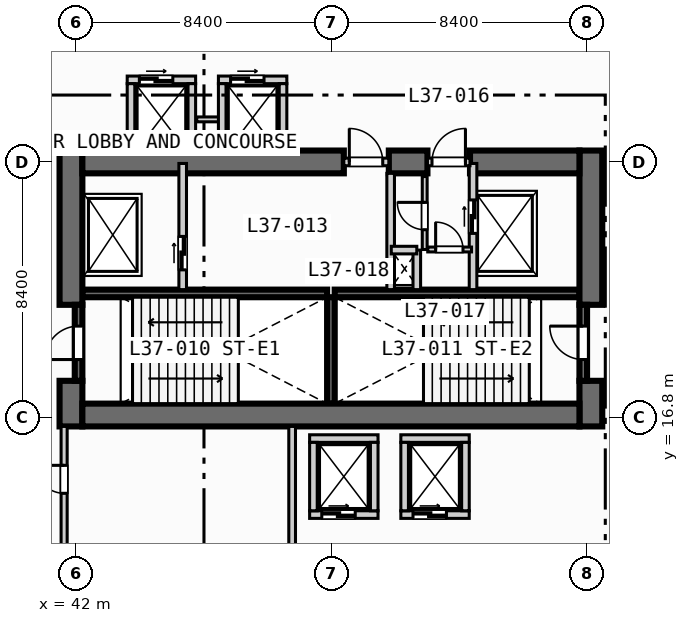
"""IFC4 building model, lengths in metres.
Left out: names, types, materials, properties, quantities, classifications, styles, units other than length and angle.
Written with IfcOpenShell. Run it as: python <this file> out.ifc"""

import sys

from ifc_helpers import new_model, si_unit, direction, frame, frame_2d, origin, place, context, subcontext, project, spatial, rectangle, extrude, element, fill, save


model = new_model("IFC4")
c1 = context("Model", 3, precision=1e-05, world=origin(), true_north=direction((0.0, 1.0)))
c2 = subcontext(c1, "Body", "Model", "MODEL_VIEW")
j1 = project(units=[si_unit("LENGTHUNIT", "METRE"), si_unit("PLANEANGLEUNIT", "RADIAN")], contexts=[c1])
p1 = place(None, origin())
s1 = spatial("IfcSite", under=j1, at=p1, CompositionType="ELEMENT")
p2 = place(p1, origin())
s2 = spatial("IfcBuilding", under=s1, at=p2, CompositionType="ELEMENT")
p3 = place(p2, frame((0.0, 0.0, 153.2)))
s3 = spatial("IfcBuildingStorey", under=s2, at=p3, CompositionType="ELEMENT", Elevation=153.2)
for number, where, z_axis, x_axis in (
    (1, (42.2, 20.875, 0.0), (0.0, 0.0, 1.0), (1.0, 0.0, 0.0)),
    (2, (50.5, 20.875, 0.0), (0.0, 0.0, 1.0), (1.0, 0.0, 0.0)),
):
    element("IfcWall", number, at=place(p3, frame(where, z_axis=z_axis, x_axis=x_axis)), inside=s3, PredefinedType="SOLIDWALL", context=c2, shape_type="SweptSolid", body=[
        extrude(rectangle(XDim=8.05, YDim=0.25, at=frame_2d((4.025, 0.0))), origin(), (0.0, 0.0, 1.0), 4.15),
    ])
p4 = place(p3, frame((50.375, 17.25, 0.0), z_axis=(0.0, 0.0, 1.0), x_axis=(0.0, 1.0, 0.0)))
e3 = element("IfcWall", 3, at=p4, inside=s3, PredefinedType="SOLIDWALL", context=c2, shape_type="SweptSolid", body=[
    extrude(rectangle(XDim=3.5, YDim=0.25, at=frame_2d((1.75, 0.0))), origin(), (0.0, 0.0, 1.0), 4.15),
])
p5 = place(p3, frame((41.825, 16.5, 0.0), z_axis=(0.0, 0.0, 1.0), x_axis=(0.0, 1.0, 0.0)))
e4 = element("IfcWall", 4, at=p5, inside=s3, PredefinedType="SHEAR", context=c2, shape_type="SweptSolid", body=[
    extrude(rectangle(XDim=1.5, YDim=0.75, at=frame_2d((0.75, 0.0))), origin(), (0.0, 0.0, 1.0), 4.15),
])
p6 = place(p3, frame((41.825, 20.5, 0.0), z_axis=(0.0, 0.0, 1.0), x_axis=(0.0, 1.0, 0.0)))
e5 = element("IfcWall", 5, at=p6, inside=s3, PredefinedType="SHEAR", context=c2, shape_type="SweptSolid", body=[
    extrude(rectangle(XDim=5.075, YDim=0.75, at=frame_2d((2.538, 0.0))), origin(), (0.0, 0.0, 1.0), 4.15),
])
p7 = place(p3, frame((58.925, 16.5, 0.0), z_axis=(0.0, 0.0, 1.0), x_axis=(0.0, 1.0, 0.0)))
e6 = element("IfcWall", 6, at=p7, inside=s3, PredefinedType="SHEAR", context=c2, shape_type="SweptSolid", body=[
    extrude(rectangle(XDim=1.5, YDim=0.75, at=frame_2d((0.75, 0.0))), origin(), (0.0, 0.0, 1.0), 4.15),
])
p8 = place(p3, frame((58.925, 20.5, 0.0), z_axis=(0.0, 0.0, 1.0), x_axis=(0.0, 1.0, 0.0)))
e7 = element("IfcWall", 7, at=p8, inside=s3, PredefinedType="SHEAR", context=c2, shape_type="SweptSolid", body=[
    extrude(rectangle(XDim=5.075, YDim=0.75, at=frame_2d((2.538, 0.0))), origin(), (0.0, 0.0, 1.0), 4.15),
])
p9 = place(p3, frame((42.2, 16.875, 0.0), z_axis=(0.0, 0.0, 1.0), x_axis=(1.0, 0.0, 0.0)))
e8 = element("IfcWall", 8, at=p9, inside=s3, PredefinedType="SHEAR", context=c2, shape_type="SweptSolid", body=[
    extrude(rectangle(XDim=16.35, YDim=0.75, at=frame_2d((8.175, 0.0))), origin(), (0.0, 0.0, 1.0), 4.15),
])
p10 = place(p3, frame((42.2, 25.2, 0.0), z_axis=(0.0, 0.0, 1.0), x_axis=(1.0, 0.0, 0.0)))
e9 = element("IfcWall", 9, at=p10, inside=s3, PredefinedType="SHEAR", context=c2, shape_type="SweptSolid", body=[
    extrude(rectangle(XDim=8.6, YDim=0.75, at=frame_2d((4.3, 0.0))), origin(), (0.0, 0.0, 1.0), 4.15),
])
p11 = place(p3, frame((52.28, 25.2, 0.0), z_axis=(0.0, 0.0, 1.0), x_axis=(1.0, 0.0, 0.0)))
e10 = element("IfcWall", 10, at=p11, inside=s3, PredefinedType="SHEAR", context=c2, shape_type="SweptSolid", body=[
    extrude(rectangle(XDim=1.27, YDim=0.75, at=frame_2d((0.635, 0.0))), origin(), (0.0, 0.0, 1.0), 4.15),
])
p12 = place(p3, frame((54.95, 25.2, 0.0), z_axis=(0.0, 0.0, 1.0), x_axis=(1.0, 0.0, 0.0)))
e11 = element("IfcWall", 11, at=p12, inside=s3, PredefinedType="SHEAR", context=c2, shape_type="SweptSolid", body=[
    extrude(rectangle(XDim=3.6, YDim=0.75, at=frame_2d((1.8, 0.0))), origin(), (0.0, 0.0, 1.0), 4.15),
])
p13 = place(p3, frame((42.075, 18.0, 0.0), z_axis=(0.0, 0.0, 1.0), x_axis=(0.0, 1.0, 0.0)))
e12 = element("IfcWall", 12, at=p13, inside=s3, PredefinedType="SOLIDWALL", context=c2, shape_type="SweptSolid", body=[
    extrude(rectangle(XDim=2.5, YDim=0.25, at=frame_2d((1.25, 0.0))), origin(), (0.0, 0.0, 1.0), 4.15),
])
p14 = place(p13, frame((0.7, 0.0, 0.0)))
e13 = element("IfcOpeningElement", 13, at=p14, cuts=e12, PredefinedType="OPENING", context=c2, shape_type="SweptSolid", body=[
    extrude(rectangle(XDim=1.1, YDim=2.15, at=frame_2d((0.55, 1.075))), frame((0.0, 0.135, 0.0), z_axis=(0.0, -1.0, 0.0), x_axis=(1.0, 0.0, 0.0)), (0.0, 0.0, 1.0), 0.27),
])
p15 = place(p3, frame((58.675, 18.0, 0.0), z_axis=(0.0, 0.0, 1.0), x_axis=(0.0, 1.0, 0.0)))
e14 = element("IfcWall", 14, at=p15, inside=s3, PredefinedType="SOLIDWALL", context=c2, shape_type="SweptSolid", body=[
    extrude(rectangle(XDim=2.5, YDim=0.25, at=frame_2d((1.25, 0.0))), origin(), (0.0, 0.0, 1.0), 4.15),
])
p16 = place(p15, frame((0.7, 0.0, 0.0)))
e15 = element("IfcOpeningElement", 15, at=p16, cuts=e14, PredefinedType="OPENING", context=c2, shape_type="SweptSolid", body=[
    extrude(rectangle(XDim=1.1, YDim=2.15, at=frame_2d((0.55, 1.075))), frame((0.0, 0.135, 0.0), z_axis=(0.0, -1.0, 0.0), x_axis=(1.0, 0.0, 0.0)), (0.0, 0.0, 1.0), 0.27),
])
p17 = place(p3, frame((45.5, 21.0, 0.0), z_axis=(0.0, 0.0, 1.0), x_axis=(0.0, 1.0, 0.0)))
e16 = element("IfcWall", 16, at=p17, inside=s3, PredefinedType="SOLIDWALL", context=c2, shape_type="SweptSolid", body=[
    extrude(rectangle(XDim=4.15, YDim=0.25, at=frame_2d((2.075, 0.0))), origin(), (0.0, 0.0, 1.0), 4.15),
])
p18 = place(p17, frame((0.65, 0.0, 0.0)))
e17 = element("IfcOpeningElement", 17, at=p18, cuts=e16, PredefinedType="OPENING", context=c2, shape_type="SweptSolid", body=[
    extrude(rectangle(XDim=1.1, YDim=2.15, at=frame_2d((0.55, 1.075))), frame((0.0, 0.135, 0.0), z_axis=(0.0, -1.0, 0.0), x_axis=(1.0, 0.0, 0.0)), (0.0, 0.0, 1.0), 0.27),
])
p19 = place(p3, frame((50.8, 25.2, 0.0), z_axis=(0.0, 0.0, 1.0), x_axis=(1.0, 0.0, 0.0)))
e18 = element("IfcWall", 18, at=p19, inside=s3, PredefinedType="SOLIDWALL", context=c2, shape_type="SweptSolid", body=[
    extrude(rectangle(XDim=1.48, YDim=0.25, at=frame_2d((0.74, 0.0))), origin(), (0.0, 0.0, 1.0), 4.15),
])
p20 = place(p19, frame((0.18, 0.0, 0.0)))
e19 = element("IfcOpeningElement", 19, at=p20, cuts=e18, PredefinedType="OPENING", context=c2, shape_type="SweptSolid", body=[
    extrude(rectangle(XDim=1.1, YDim=2.15, at=frame_2d((0.55, 1.075))), frame((0.0, 0.135, 0.0), z_axis=(0.0, -1.0, 0.0), x_axis=(1.0, 0.0, 0.0)), (0.0, 0.0, 1.0), 0.27),
])
p21 = place(p3, frame((52.34, 21.0, 0.0), z_axis=(0.0, 0.0, 1.0), x_axis=(0.0, 1.0, 0.0)))
e20 = element("IfcWall", 20, at=p21, inside=s3, PredefinedType="SOLIDWALL", context=c2, shape_type="SweptSolid", body=[
    extrude(rectangle(XDim=3.825, YDim=0.25, at=frame_2d((1.913, 0.0))), origin(), (0.0, 0.0, 1.0), 4.15),
])
p22 = place(p3, frame((55.05, 21.0, 0.0), z_axis=(0.0, 0.0, 1.0), x_axis=(0.0, 1.0, 0.0)))
e21 = element("IfcWall", 21, at=p22, inside=s3, PredefinedType="SOLIDWALL", context=c2, shape_type="SweptSolid", body=[
    extrude(rectangle(XDim=4.15, YDim=0.25, at=frame_2d((2.075, 0.0))), origin(), (0.0, 0.0, 1.0), 4.15),
])
p23 = place(p22, frame((1.85, 0.0, 0.0)))
e22 = element("IfcOpeningElement", 22, at=p23, cuts=e21, PredefinedType="OPENING", context=c2, shape_type="SweptSolid", body=[
    extrude(rectangle(XDim=1.1, YDim=2.15, at=frame_2d((0.55, 1.075))), frame((0.0, 0.135, 0.0), z_axis=(0.0, -1.0, 0.0), x_axis=(1.0, 0.0, 0.0)), (0.0, 0.0, 1.0), 0.27),
])
p24 = place(p3, frame((53.55, 25.2, 0.0), z_axis=(0.0, 0.0, 1.0), x_axis=(1.0, 0.0, 0.0)))
e23 = element("IfcWall", 23, at=p24, inside=s3, PredefinedType="SOLIDWALL", context=c2, shape_type="SweptSolid", body=[
    extrude(rectangle(XDim=1.4, YDim=0.25, at=frame_2d((0.7, 0.0))), origin(), (0.0, 0.0, 1.0), 4.15),
])
p25 = place(p24, frame((0.15, 0.0, 0.0)))
e24 = element("IfcOpeningElement", 24, at=p25, cuts=e23, PredefinedType="OPENING", context=c2, shape_type="SweptSolid", body=[
    extrude(rectangle(XDim=1.1, YDim=2.15, at=frame_2d((0.55, 1.075))), frame((0.0, 0.135, 0.0), z_axis=(0.0, -1.0, 0.0), x_axis=(1.0, 0.0, 0.0)), (0.0, 0.0, 1.0), 0.27),
])
p26 = place(p3, frame((53.2, 21.0, 0.0), z_axis=(0.0, 0.0, 1.0), x_axis=(0.0, 1.0, 0.0)))
e25 = element("IfcWall", 25, at=p26, inside=s3, PredefinedType="SOLIDWALL", context=c2, shape_type="SweptSolid", body=[
    extrude(rectangle(XDim=1.3, YDim=0.25, at=frame_2d((0.65, 0.0))), origin(), (0.0, 0.0, 1.0), 4.15),
])
p27 = place(p3, frame((52.36, 22.3, 0.0), z_axis=(0.0, 0.0, 1.0), x_axis=(1.0, 0.0, 0.0)))
e26 = element("IfcWall", 26, at=p27, inside=s3, PredefinedType="SOLIDWALL", context=c2, shape_type="SweptSolid", body=[
    extrude(rectangle(XDim=0.84, YDim=0.25, at=frame_2d((0.42, 0.0))), origin(), (0.0, 0.0, 1.0), 4.15),
])
p28 = place(p3, frame((53.56, 22.32, 0.0), z_axis=(0.0, 0.0, 1.0), x_axis=(1.0, 0.0, 0.0)))
e27 = element("IfcWall", 27, at=p28, inside=s3, PredefinedType="PARTITIONING", context=c2, shape_type="SweptSolid", body=[
    extrude(rectangle(XDim=1.44, YDim=0.16, at=frame_2d((0.72, 0.0))), origin(), (0.0, 0.0, 1.0), 4.15),
])
p29 = place(p28, frame((0.26, 0.0, 0.0)))
e28 = element("IfcOpeningElement", 28, at=p29, cuts=e27, PredefinedType="OPENING", context=c2, shape_type="SweptSolid", body=[
    extrude(rectangle(XDim=0.9, YDim=2.1, at=frame_2d((0.45, 1.05))), frame((0.0, 0.09, 0.0), z_axis=(0.0, -1.0, 0.0), x_axis=(1.0, 0.0, 0.0)), (0.0, 0.0, 1.0), 0.18),
])
p30 = place(p3, frame((53.46, 22.32, 0.0), z_axis=(0.0, 0.0, 1.0), x_axis=(0.0, 1.0, 0.0)))
e29 = element("IfcWall", 29, at=p30, inside=s3, PredefinedType="PARTITIONING", context=c2, shape_type="SweptSolid", body=[
    extrude(rectangle(XDim=2.4, YDim=0.16, at=frame_2d((1.2, 0.0))), origin(), (0.0, 0.0, 1.0), 4.15),
])
p31 = place(p30, frame((0.65, 0.0, 0.0)))
e30 = element("IfcOpeningElement", 30, at=p31, cuts=e29, PredefinedType="OPENING", context=c2, shape_type="SweptSolid", body=[
    extrude(rectangle(XDim=0.9, YDim=2.1, at=frame_2d((0.45, 1.05))), frame((0.0, 0.09, 0.0), z_axis=(0.0, -1.0, 0.0), x_axis=(1.0, 0.0, 0.0)), (0.0, 0.0, 1.0), 0.18),
])
p32 = place(p3, frame((49.675, 13.6, 0.0), z_axis=(0.0, 0.0, 1.0), x_axis=(1.0, 0.0, 0.0)))
e31 = element("IfcWall", 31, at=p32, inside=s3, PredefinedType="SOLIDWALL", context=c2, shape_type="SweptSolid", body=[
    extrude(rectangle(XDim=2.25, YDim=0.25, at=frame_2d((1.125, 0.0))), origin(), (0.0, 0.0, 1.0), 4.15),
])
p33 = place(p32, frame((0.4, 0.0, 0.0)))
e32 = element("IfcOpeningElement", 32, at=p33, cuts=e31, PredefinedType="OPENING", context=c2, shape_type="SweptSolid", body=[
    extrude(rectangle(XDim=1.1, YDim=2.15, at=frame_2d((0.55, 1.075))), frame((0.0, 0.135, 0.0), z_axis=(0.0, -1.0, 0.0), x_axis=(1.0, 0.0, 0.0)), (0.0, 0.0, 1.0), 0.27),
])
for number, where, z_axis, x_axis in (
    (33, (49.675, 16.1, 0.0), (0.0, 0.0, 1.0), (1.0, 0.0, 0.0)),
    (34, (49.8, 13.725, 0.0), (0.0, 0.0, 1.0), (0.0, 1.0, 0.0)),
    (35, (51.8, 13.725, 0.0), (0.0, 0.0, 1.0), (0.0, 1.0, 0.0)),
):
    element("IfcWall", number, at=place(p3, frame(where, z_axis=z_axis, x_axis=x_axis)), inside=s3, PredefinedType="SOLIDWALL", context=c2, shape_type="SweptSolid", body=[
        extrude(rectangle(XDim=2.25, YDim=0.25, at=frame_2d((1.125, 0.0))), origin(), (0.0, 0.0, 1.0), 4.15),
    ])
p34 = place(p3, frame((52.675, 13.6, 0.0), z_axis=(0.0, 0.0, 1.0), x_axis=(1.0, 0.0, 0.0)))
e36 = element("IfcWall", 36, at=p34, inside=s3, PredefinedType="SOLIDWALL", context=c2, shape_type="SweptSolid", body=[
    extrude(rectangle(XDim=2.25, YDim=0.25, at=frame_2d((1.125, 0.0))), origin(), (0.0, 0.0, 1.0), 4.15),
])
p35 = place(p34, frame((0.4, 0.0, 0.0)))
e37 = element("IfcOpeningElement", 37, at=p35, cuts=e36, PredefinedType="OPENING", context=c2, shape_type="SweptSolid", body=[
    extrude(rectangle(XDim=1.1, YDim=2.15, at=frame_2d((0.55, 1.075))), frame((0.0, 0.135, 0.0), z_axis=(0.0, -1.0, 0.0), x_axis=(1.0, 0.0, 0.0)), (0.0, 0.0, 1.0), 0.27),
])
for number, where, z_axis, x_axis in (
    (38, (52.675, 16.1, 0.0), (0.0, 0.0, 1.0), (1.0, 0.0, 0.0)),
    (39, (52.8, 13.725, 0.0), (0.0, 0.0, 1.0), (0.0, 1.0, 0.0)),
    (40, (54.8, 13.725, 0.0), (0.0, 0.0, 1.0), (0.0, 1.0, 0.0)),
):
    element("IfcWall", number, at=place(p3, frame(where, z_axis=z_axis, x_axis=x_axis)), inside=s3, PredefinedType="SOLIDWALL", context=c2, shape_type="SweptSolid", body=[
        extrude(rectangle(XDim=2.25, YDim=0.25, at=frame_2d((1.125, 0.0))), origin(), (0.0, 0.0, 1.0), 4.15),
    ])
p36 = place(p3, frame((43.675, 27.9, 0.0), z_axis=(0.0, 0.0, 1.0), x_axis=(1.0, 0.0, 0.0)))
e41 = element("IfcWall", 41, at=p36, inside=s3, PredefinedType="SOLIDWALL", context=c2, shape_type="SweptSolid", body=[
    extrude(rectangle(XDim=2.25, YDim=0.25, at=frame_2d((1.125, 0.0))), origin(), (0.0, 0.0, 1.0), 4.15),
])
p37 = place(p36, frame((0.4, 0.0, 0.0)))
e42 = element("IfcOpeningElement", 42, at=p37, cuts=e41, PredefinedType="OPENING", context=c2, shape_type="SweptSolid", body=[
    extrude(rectangle(XDim=1.1, YDim=2.15, at=frame_2d((0.55, 1.075))), frame((0.0, 0.135, 0.0), z_axis=(0.0, -1.0, 0.0), x_axis=(1.0, 0.0, 0.0)), (0.0, 0.0, 1.0), 0.27),
])
for number, where, z_axis, x_axis in (
    (43, (43.8, 25.45, 0.0), (0.0, 0.0, 1.0), (0.0, 1.0, 0.0)),
    (44, (45.8, 25.45, 0.0), (0.0, 0.0, 1.0), (0.0, 1.0, 0.0)),
):
    element("IfcWall", number, at=place(p3, frame(where, z_axis=z_axis, x_axis=x_axis)), inside=s3, PredefinedType="SOLIDWALL", context=c2, shape_type="SweptSolid", body=[
        extrude(rectangle(XDim=2.325, YDim=0.25, at=frame_2d((1.163, 0.0))), origin(), (0.0, 0.0, 1.0), 4.15),
    ])
p38 = place(p3, frame((45.96, 26.6, 0.0), z_axis=(0.0, 0.0, 1.0), x_axis=(1.0, 0.0, 0.0)))
e45 = element("IfcWall", 45, at=p38, inside=s3, PredefinedType="PARTITIONING", context=c2, shape_type="SweptSolid", body=[
    extrude(rectangle(XDim=0.88, YDim=0.16, at=frame_2d((0.44, 0.0))), origin(), (0.0, 0.0, 1.0), 4.15),
])
p39 = place(p3, frame((46.675, 27.9, 0.0), z_axis=(0.0, 0.0, 1.0), x_axis=(1.0, 0.0, 0.0)))
e46 = element("IfcWall", 46, at=p39, inside=s3, PredefinedType="SOLIDWALL", context=c2, shape_type="SweptSolid", body=[
    extrude(rectangle(XDim=2.25, YDim=0.25, at=frame_2d((1.125, 0.0))), origin(), (0.0, 0.0, 1.0), 4.15),
])
p40 = place(p39, frame((0.4, 0.0, 0.0)))
e47 = element("IfcOpeningElement", 47, at=p40, cuts=e46, PredefinedType="OPENING", context=c2, shape_type="SweptSolid", body=[
    extrude(rectangle(XDim=1.1, YDim=2.15, at=frame_2d((0.55, 1.075))), frame((0.0, 0.135, 0.0), z_axis=(0.0, -1.0, 0.0), x_axis=(1.0, 0.0, 0.0)), (0.0, 0.0, 1.0), 0.27),
])
for number, where, z_axis, x_axis in (
    (48, (46.8, 25.45, 0.0), (0.0, 0.0, 1.0), (0.0, 1.0, 0.0)),
    (49, (48.8, 25.45, 0.0), (0.0, 0.0, 1.0), (0.0, 1.0, 0.0)),
):
    element("IfcWall", number, at=place(p3, frame(where, z_axis=z_axis, x_axis=x_axis)), inside=s3, PredefinedType="SOLIDWALL", context=c2, shape_type="SweptSolid", body=[
        extrude(rectangle(XDim=2.325, YDim=0.25, at=frame_2d((1.163, 0.0))), origin(), (0.0, 0.0, 1.0), 4.15),
    ])
p41 = place(p3, frame((41.6, 0.3, 0.0), z_axis=(0.0, 0.0, 1.0), x_axis=(0.0, 1.0, 0.0)))
e50 = element("IfcWall", 50, at=p41, inside=s3, PredefinedType="PARTITIONING", context=c2, shape_type="SweptSolid", body=[
    extrude(rectangle(XDim=16.2, YDim=0.2, at=frame_2d((8.1, 0.0))), origin(), (0.0, 0.0, 1.0), 4.15),
])
p42 = place(p41, frame((14.0, 0.0, 0.0)))
e51 = element("IfcOpeningElement", 51, at=p42, cuts=e50, PredefinedType="OPENING", context=c2, shape_type="SweptSolid", body=[
    extrude(rectangle(XDim=0.92, YDim=2.1, at=frame_2d((0.46, 1.05))), frame((0.0, 0.11, 0.0), z_axis=(0.0, -1.0, 0.0), x_axis=(1.0, 0.0, 0.0)), (0.0, 0.0, 1.0), 0.22),
])
p43 = place(p3, frame((49.1, 0.3, 0.0), z_axis=(0.0, 0.0, 1.0), x_axis=(0.0, 1.0, 0.0)))
e52 = element("IfcWall", 52, at=p43, inside=s3, PredefinedType="PARTITIONING", context=c2, shape_type="SweptSolid", body=[
    extrude(rectangle(XDim=16.2, YDim=0.22, at=frame_2d((8.1, 0.0))), origin(), (0.0, 0.0, 1.0), 4.15),
])
p44 = place(p14, origin())
e53 = element("IfcDoor", 53, at=p44, inside=s3, OperationType="SINGLE_SWING_LEFT", PredefinedType="DOOR", context=c2, shape_type="SweptSolid", body=[
    extrude(rectangle(XDim=1.1, YDim=2.15, at=frame_2d((0.55, 1.075))), frame((0.0, 0.025, 0.0), z_axis=(0.0, -1.0, 0.0), x_axis=(1.0, 0.0, 0.0)), (0.0, 0.0, 1.0), 0.05),
])
fill(e13, e53)
p45 = place(p16, origin())
e54 = element("IfcDoor", 54, at=p45, inside=s3, OperationType="SINGLE_SWING_RIGHT", PredefinedType="DOOR", context=c2, shape_type="SweptSolid", body=[
    extrude(rectangle(XDim=1.1, YDim=2.15, at=frame_2d((0.55, 1.075))), frame((0.0, 0.025, 0.0), z_axis=(0.0, -1.0, 0.0), x_axis=(1.0, 0.0, 0.0)), (0.0, 0.0, 1.0), 0.05),
])
fill(e15, e54)
p46 = place(p18, origin())
e55 = element("IfcDoor", 55, at=p46, inside=s3, OperationType="SLIDING_TO_LEFT", PredefinedType="DOOR", context=c2, shape_type="SweptSolid", body=[
    extrude(rectangle(XDim=1.1, YDim=2.15, at=frame_2d((0.55, 1.075))), frame((0.0, 0.025, 0.0), z_axis=(0.0, -1.0, 0.0), x_axis=(1.0, 0.0, 0.0)), (0.0, 0.0, 1.0), 0.05),
])
fill(e17, e55)
p47 = place(p20, origin())
e56 = element("IfcDoor", 56, at=p47, inside=s3, OperationType="SINGLE_SWING_LEFT", PredefinedType="DOOR", context=c2, shape_type="SweptSolid", body=[
    extrude(rectangle(XDim=1.1, YDim=2.15, at=frame_2d((0.55, 1.075))), frame((0.0, 0.025, 0.0), z_axis=(0.0, -1.0, 0.0), x_axis=(1.0, 0.0, 0.0)), (0.0, 0.0, 1.0), 0.05),
])
fill(e19, e56)
p48 = place(p23, origin())
e57 = element("IfcDoor", 57, at=p48, inside=s3, OperationType="SLIDING_TO_LEFT", PredefinedType="DOOR", context=c2, shape_type="SweptSolid", body=[
    extrude(rectangle(XDim=1.1, YDim=2.15, at=frame_2d((0.55, 1.075))), frame((0.0, 0.025, 0.0), z_axis=(0.0, -1.0, 0.0), x_axis=(1.0, 0.0, 0.0)), (0.0, 0.0, 1.0), 0.05),
])
fill(e22, e57)
p49 = place(p25, origin())
e58 = element("IfcDoor", 58, at=p49, inside=s3, OperationType="SINGLE_SWING_RIGHT", PredefinedType="DOOR", context=c2, shape_type="SweptSolid", body=[
    extrude(rectangle(XDim=1.1, YDim=2.15, at=frame_2d((0.55, 1.075))), frame((0.0, 0.025, 0.0), z_axis=(0.0, -1.0, 0.0), x_axis=(1.0, 0.0, 0.0)), (0.0, 0.0, 1.0), 0.05),
])
fill(e24, e58)
p50 = place(p29, origin())
e59 = element("IfcDoor", 59, at=p50, inside=s3, OperationType="SINGLE_SWING_LEFT", PredefinedType="DOOR", context=c2, shape_type="SweptSolid", body=[
    extrude(rectangle(XDim=0.9, YDim=2.1, at=frame_2d((0.45, 1.05))), frame((0.0, 0.025, 0.0), z_axis=(0.0, -1.0, 0.0), x_axis=(1.0, 0.0, 0.0)), (0.0, 0.0, 1.0), 0.05),
])
fill(e28, e59)
p51 = place(p31, origin())
e60 = element("IfcDoor", 60, at=p51, inside=s3, OperationType="SINGLE_SWING_RIGHT", PredefinedType="DOOR", context=c2, shape_type="SweptSolid", body=[
    extrude(rectangle(XDim=0.9, YDim=2.1, at=frame_2d((0.45, 1.05))), frame((0.0, 0.025, 0.0), z_axis=(0.0, -1.0, 0.0), x_axis=(1.0, 0.0, 0.0)), (0.0, 0.0, 1.0), 0.05),
])
fill(e30, e60)
p52 = place(p33, origin())
e61 = element("IfcDoor", 61, at=p52, inside=s3, OperationType="SLIDING_TO_LEFT", PredefinedType="DOOR", context=c2, shape_type="SweptSolid", body=[
    extrude(rectangle(XDim=1.1, YDim=2.15, at=frame_2d((0.55, 1.075))), frame((0.0, 0.025, 0.0), z_axis=(0.0, -1.0, 0.0), x_axis=(1.0, 0.0, 0.0)), (0.0, 0.0, 1.0), 0.05),
])
fill(e32, e61)
p53 = place(p35, origin())
e62 = element("IfcDoor", 62, at=p53, inside=s3, OperationType="SLIDING_TO_LEFT", PredefinedType="DOOR", context=c2, shape_type="SweptSolid", body=[
    extrude(rectangle(XDim=1.1, YDim=2.15, at=frame_2d((0.55, 1.075))), frame((0.0, 0.025, 0.0), z_axis=(0.0, -1.0, 0.0), x_axis=(1.0, 0.0, 0.0)), (0.0, 0.0, 1.0), 0.05),
])
fill(e37, e62)
p54 = place(p37, origin())
e63 = element("IfcDoor", 63, at=p54, inside=s3, OperationType="SLIDING_TO_LEFT", PredefinedType="DOOR", context=c2, shape_type="SweptSolid", body=[
    extrude(rectangle(XDim=1.1, YDim=2.15, at=frame_2d((0.55, 1.075))), frame((0.0, 0.025, 0.0), z_axis=(0.0, -1.0, 0.0), x_axis=(1.0, 0.0, 0.0)), (0.0, 0.0, 1.0), 0.05),
])
fill(e42, e63)
p55 = place(p40, origin())
e64 = element("IfcDoor", 64, at=p55, inside=s3, OperationType="SLIDING_TO_LEFT", PredefinedType="DOOR", context=c2, shape_type="SweptSolid", body=[
    extrude(rectangle(XDim=1.1, YDim=2.15, at=frame_2d((0.55, 1.075))), frame((0.0, 0.025, 0.0), z_axis=(0.0, -1.0, 0.0), x_axis=(1.0, 0.0, 0.0)), (0.0, 0.0, 1.0), 0.05),
])
fill(e47, e64)
p56 = place(p42, origin())
e65 = element("IfcDoor", 65, at=p56, inside=s3, OperationType="SINGLE_SWING_RIGHT", PredefinedType="DOOR", context=c2, shape_type="SweptSolid", body=[
    extrude(rectangle(XDim=0.92, YDim=2.1, at=frame_2d((0.46, 1.05))), frame((0.0, 0.025, 0.0), z_axis=(0.0, -1.0, 0.0), x_axis=(1.0, 0.0, 0.0)), (0.0, 0.0, 1.0), 0.05),
])
fill(e51, e65)
save(model, sys.argv[1])
